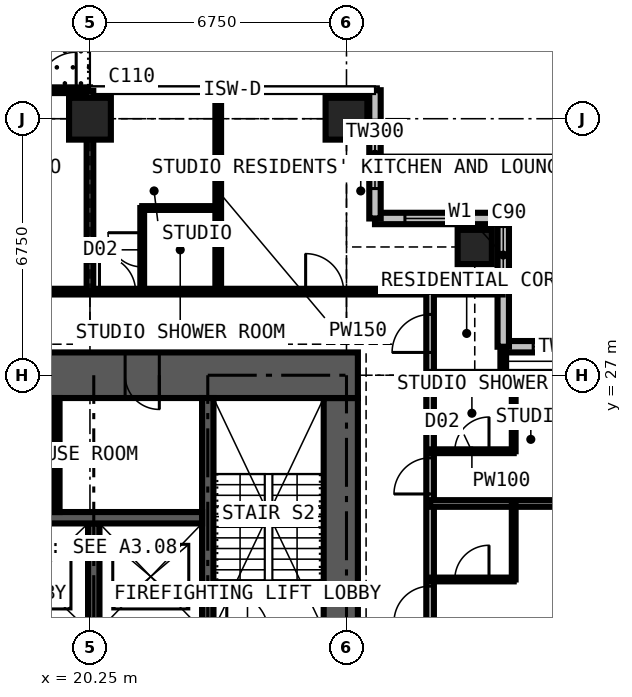
"""IFC4 building model, lengths in metres.
Left out: names, types, materials, properties, quantities, classifications, styles, units other than length and angle.
Written with IfcOpenShell. Run it as: python <this file> out.ifc"""

import sys

from ifc_helpers import new_model, si_unit, direction, frame, frame_2d, origin, origin_2d, place, context, subcontext, project, spatial, rectangle, extrude, element, fill, save


model = new_model("IFC4")
c1 = context("Model", 3, precision=1e-05, world=origin(), true_north=direction((0.0, 1.0)))
c2 = subcontext(c1, "Body", "Model", "MODEL_VIEW")
j1 = project(units=[si_unit("LENGTHUNIT", "METRE"), si_unit("PLANEANGLEUNIT", "RADIAN")], contexts=[c1])
p1 = place(None, origin())
s1 = spatial("IfcSite", under=j1, at=p1, CompositionType="ELEMENT")
p2 = place(p1, origin())
s2 = spatial("IfcBuilding", under=s1, at=p2, CompositionType="ELEMENT")
p3 = place(p2, frame((0.0, 0.0, 218.7)))
s3 = spatial("IfcBuildingStorey", under=s2, at=p3, CompositionType="ELEMENT", Elevation=218.7)
for number, where, z_axis, x_axis in (
    (1, (20.25, 33.75, 0.0), (0.0, 0.0, 1.0), (1.0, 0.0, 0.0)),
    (2, (27.0, 33.75, 0.0), (0.0, 0.0, 1.0), (1.0, 0.0, 0.0)),
):
    element("IfcColumn", number, at=place(p3, frame(where, z_axis=z_axis, x_axis=x_axis)), inside=s3, PredefinedType="COLUMN", context=c2, shape_type="SweptSolid", body=[
        extrude(rectangle(XDim=1.1, YDim=1.1, at=origin_2d()), origin(), (0.0, 0.0, 1.0), 3.6),
    ])
p4 = place(p3, frame((30.375, 30.375, 0.0), z_axis=(0.0, 0.0, 1.0), x_axis=(1.0, 0.0, 0.0)))
e3 = element("IfcColumn", 3, at=p4, inside=s3, PredefinedType="COLUMN", context=c2, shape_type="SweptSolid", body=[
    extrude(rectangle(XDim=0.9, YDim=0.9, at=origin_2d()), origin(), (0.0, 0.0, 1.0), 3.6),
])
p5 = place(p3, frame((26.85, 14.1, 0.0), z_axis=(0.0, 0.0, 1.0), x_axis=(0.0, 1.0, 0.0)))
e4 = element("IfcWall", 4, at=p5, inside=s3, PredefinedType="SHEAR", context=c2, shape_type="SweptSolid", body=[
    extrude(rectangle(XDim=12.3, YDim=0.9, at=frame_2d((6.15, 0.0))), origin(), (0.0, 0.0, 1.0), 3.6),
])
p6 = place(p5, frame((3.65, 0.0, 0.0)))
e5 = element("IfcOpeningElement", 5, at=p6, cuts=e4, PredefinedType="OPENING", context=c2, shape_type="SweptSolid", body=[
    extrude(rectangle(XDim=1.2, YDim=2.2, at=frame_2d((0.6, 1.1))), frame((0.0, 0.46, 0.0), z_axis=(0.0, -1.0, 0.0), x_axis=(1.0, 0.0, 0.0)), (0.0, 0.0, 1.0), 0.92),
])
p7 = place(p3, frame((27.3, 27.0, 0.0), z_axis=(0.0, 0.0, 1.0), x_axis=(-1.0, 0.0, 0.0)))
e6 = element("IfcWall", 6, at=p7, inside=s3, PredefinedType="SHEAR", context=c2, shape_type="SweptSolid", body=[
    extrude(rectangle(XDim=14.1, YDim=1.2, at=frame_2d((7.05, 0.0))), origin(), (0.0, 0.0, 1.0), 3.6),
])
p8 = place(p7, frame((5.225, 0.0, 0.0)))
e7 = element("IfcOpeningElement", 7, at=p8, cuts=e6, PredefinedType="OPENING", context=c2, shape_type="SweptSolid", body=[
    extrude(rectangle(XDim=0.9, YDim=2.2, at=frame_2d((0.45, 1.1))), frame((0.0, 0.61, 0.0), z_axis=(0.0, -1.0, 0.0), x_axis=(1.0, 0.0, 0.0)), (0.0, 0.0, 1.0), 1.22),
])
p9 = place(p7, frame((8.2, 0.0, 0.0)))
e8 = element("IfcOpeningElement", 8, at=p9, cuts=e6, PredefinedType="OPENING", context=c2, shape_type="SweptSolid", body=[
    extrude(rectangle(XDim=1.0, YDim=2.2, at=frame_2d((0.5, 1.1))), frame((0.0, 0.61, 0.0), z_axis=(0.0, -1.0, 0.0), x_axis=(1.0, 0.0, 0.0)), (0.0, 0.0, 1.0), 1.22),
])
p10 = place(p3, frame((34.5, 27.75, 0.0), z_axis=(0.0, 0.0, 1.0), x_axis=(-1.0, 0.0, 0.0)))
e9 = element("IfcWall", 9, at=p10, inside=s3, PredefinedType="SOLIDWALL", context=c2, shape_type="SweptSolid", body=[
    extrude(rectangle(XDim=3.375, YDim=0.3, at=frame_2d((1.688, 0.0))), origin(), (0.0, 0.0, 1.0), 3.375),
])
p11 = place(p10, frame((0.788, 0.0, 0.6)))
e10 = element("IfcOpeningElement", 10, at=p11, cuts=e9, PredefinedType="OPENING", context=c2, shape_type="SweptSolid", body=[
    extrude(rectangle(XDim=1.8, YDim=2.1, at=frame_2d((0.9, 1.05))), frame((0.0, 0.16, 0.0), z_axis=(0.0, -1.0, 0.0), x_axis=(1.0, 0.0, 0.0)), (0.0, 0.0, 1.0), 0.32),
])
p12 = place(p3, frame((31.125, 27.75, 0.0), z_axis=(0.0, 0.0, 1.0), x_axis=(0.0, 1.0, 0.0)))
e11 = element("IfcWall", 11, at=p12, inside=s3, PredefinedType="SOLIDWALL", context=c2, shape_type="SweptSolid", body=[
    extrude(rectangle(XDim=3.375, YDim=0.3, at=frame_2d((1.688, 0.0))), origin(), (0.0, 0.0, 1.0), 3.375),
])
p13 = place(p12, frame((1.663, 0.0, 0.9)))
e12 = element("IfcOpeningElement", 12, at=p13, cuts=e11, PredefinedType="OPENING", context=c2, shape_type="SweptSolid", body=[
    extrude(rectangle(XDim=1.5, YDim=1.8, at=frame_2d((0.75, 0.9))), frame((0.0, 0.16, 0.0), z_axis=(0.0, -1.0, 0.0), x_axis=(1.0, 0.0, 0.0)), (0.0, 0.0, 1.0), 0.32),
])
p14 = place(p3, frame((31.125, 31.125, 0.0), z_axis=(0.0, 0.0, 1.0), x_axis=(-1.0, 0.0, 0.0)))
e13 = element("IfcWall", 13, at=p14, inside=s3, PredefinedType="SOLIDWALL", context=c2, shape_type="SweptSolid", body=[
    extrude(rectangle(XDim=3.375, YDim=0.3, at=frame_2d((1.688, 0.0))), origin(), (0.0, 0.0, 1.0), 3.375),
])
p15 = place(p14, frame((0.788, 0.0, 0.6)))
e14 = element("IfcOpeningElement", 14, at=p15, cuts=e13, PredefinedType="OPENING", context=c2, shape_type="SweptSolid", body=[
    extrude(rectangle(XDim=1.8, YDim=2.1, at=frame_2d((0.9, 1.05))), frame((0.0, 0.16, 0.0), z_axis=(0.0, -1.0, 0.0), x_axis=(1.0, 0.0, 0.0)), (0.0, 0.0, 1.0), 0.32),
])
p16 = place(p3, frame((27.75, 31.125, 0.0), z_axis=(0.0, 0.0, 1.0), x_axis=(0.0, 1.0, 0.0)))
e15 = element("IfcWall", 15, at=p16, inside=s3, PredefinedType="SOLIDWALL", context=c2, shape_type="SweptSolid", body=[
    extrude(rectangle(XDim=3.375, YDim=0.3, at=frame_2d((1.688, 0.0))), origin(), (0.0, 0.0, 1.0), 3.375),
])
p17 = place(p16, frame((0.788, 0.0, 0.6)))
e16 = element("IfcOpeningElement", 16, at=p17, cuts=e15, PredefinedType="OPENING", context=c2, shape_type="SweptSolid", body=[
    extrude(rectangle(XDim=1.8, YDim=2.1, at=frame_2d((0.9, 1.05))), frame((0.0, 0.16, 0.0), z_axis=(0.0, -1.0, 0.0), x_axis=(1.0, 0.0, 0.0)), (0.0, 0.0, 1.0), 0.32),
])
p18 = place(p3, frame((13.5, 34.5, 0.0), z_axis=(0.0, 0.0, 1.0), x_axis=(1.0, 0.0, 0.0)))
e17 = element("IfcWall", 17, at=p18, inside=s3, PredefinedType="SOLIDWALL", context=c2, shape_type="SweptSolid", body=[
    extrude(rectangle(XDim=6.75, YDim=0.15, at=frame_2d((3.375, 0.0))), origin(), (0.0, 0.0, 1.0), 3.375),
])
p19 = place(p18, frame((0.363, 0.0, 0.0)))
e18 = element("IfcOpeningElement", 18, at=p19, cuts=e17, PredefinedType="OPENING", context=c2, shape_type="SweptSolid", body=[
    extrude(rectangle(XDim=1.0, YDim=2.2, at=frame_2d((0.5, 1.1))), frame((0.0, 0.085, 0.0), z_axis=(0.0, -1.0, 0.0), x_axis=(1.0, 0.0, 0.0)), (0.0, 0.0, 1.0), 0.17),
])
p20 = place(p18, frame((1.725, 0.0, 0.9)))
e19 = element("IfcOpeningElement", 19, at=p20, cuts=e17, PredefinedType="OPENING", context=c2, shape_type="SweptSolid", body=[
    extrude(rectangle(XDim=1.2, YDim=1.8, at=frame_2d((0.6, 0.9))), frame((0.0, 0.085, 0.0), z_axis=(0.0, -1.0, 0.0), x_axis=(1.0, 0.0, 0.0)), (0.0, 0.0, 1.0), 0.17),
])
p21 = place(p18, frame((5.387, 0.0, 0.0)))
e20 = element("IfcOpeningElement", 20, at=p21, cuts=e17, PredefinedType="OPENING", context=c2, shape_type="SweptSolid", body=[
    extrude(rectangle(XDim=1.0, YDim=2.2, at=frame_2d((0.5, 1.1))), frame((0.0, 0.085, 0.0), z_axis=(0.0, -1.0, 0.0), x_axis=(1.0, 0.0, 0.0)), (0.0, 0.0, 1.0), 0.17),
])
p22 = place(p18, frame((3.825, 0.0, 0.9)))
e21 = element("IfcOpeningElement", 21, at=p22, cuts=e17, PredefinedType="OPENING", context=c2, shape_type="SweptSolid", body=[
    extrude(rectangle(XDim=1.2, YDim=1.8, at=frame_2d((0.6, 0.9))), frame((0.0, 0.085, 0.0), z_axis=(0.0, -1.0, 0.0), x_axis=(1.0, 0.0, 0.0)), (0.0, 0.0, 1.0), 0.17),
])
p23 = place(p3, frame((23.35, 20.3, 0.0), z_axis=(0.0, 0.0, 1.0), x_axis=(0.0, 1.0, 0.0)))
e22 = element("IfcWall", 22, at=p23, inside=s3, PredefinedType="SHEAR", context=c2, shape_type="SweptSolid", body=[
    extrude(rectangle(XDim=6.1, YDim=0.3, at=frame_2d((3.05, 0.0))), origin(), (0.0, 0.0, 1.0), 3.6),
])
p24 = place(p3, frame((20.35, 20.3, 0.0), z_axis=(0.0, 0.0, 1.0), x_axis=(0.0, 1.0, 0.0)))
e23 = element("IfcWall", 23, at=p24, inside=s3, PredefinedType="SHEAR", context=c2, shape_type="SweptSolid", body=[
    extrude(rectangle(XDim=2.8, YDim=0.3, at=frame_2d((1.4, 0.0))), origin(), (0.0, 0.0, 1.0), 3.6),
])
p25 = place(p3, frame((17.3, 23.25, 0.0), z_axis=(0.0, 0.0, 1.0), x_axis=(1.0, 0.0, 0.0)))
e24 = element("IfcWall", 24, at=p25, inside=s3, PredefinedType="SHEAR", context=c2, shape_type="SweptSolid", body=[
    extrude(rectangle(XDim=5.9, YDim=0.3, at=frame_2d((2.95, 0.0))), origin(), (0.0, 0.0, 1.0), 3.6),
])
p26 = place(p3, frame((19.375, 23.4, 0.0), z_axis=(0.0, 0.0, 1.0), x_axis=(0.0, 1.0, 0.0)))
e25 = element("IfcWall", 25, at=p26, inside=s3, PredefinedType="PARTITIONING", context=c2, shape_type="SweptSolid", body=[
    extrude(rectangle(XDim=3.0, YDim=0.15, at=frame_2d((1.5, 0.0))), origin(), (0.0, 0.0, 1.0), 3.375),
])
p27 = place(p3, frame((11.3, 29.2, 0.0), z_axis=(0.0, 0.0, 1.0), x_axis=(1.0, 0.0, 0.0)))
e26 = element("IfcWall", 26, at=p27, inside=s3, PredefinedType="PARTITIONING", context=c2, shape_type="SweptSolid", body=[
    extrude(rectangle(XDim=19.809, YDim=0.15, at=frame_2d((9.904, 0.0))), origin(), (0.0, 0.0, 1.0), 3.375),
])
p28 = place(p27, frame((14.625, 0.0, 0.0)))
e27 = element("IfcOpeningElement", 27, at=p28, cuts=e26, PredefinedType="OPENING", context=c2, shape_type="SweptSolid", body=[
    extrude(rectangle(XDim=1.0, YDim=2.2, at=frame_2d((0.5, 1.1))), frame((0.0, 0.085, 0.0), z_axis=(0.0, -1.0, 0.0), x_axis=(1.0, 0.0, 0.0)), (0.0, 0.0, 1.0), 0.17),
])
p29 = place(p27, frame((6.4, 0.0, 0.0)))
e28 = element("IfcOpeningElement", 28, at=p29, cuts=e26, PredefinedType="OPENING", context=c2, shape_type="SweptSolid", body=[
    extrude(rectangle(XDim=0.95, YDim=2.2, at=frame_2d((0.475, 1.1))), frame((0.0, 0.085, 0.0), z_axis=(0.0, -1.0, 0.0), x_axis=(1.0, 0.0, 0.0)), (0.0, 0.0, 1.0), 0.17),
])
p30 = place(p27, frame((9.2, 0.0, 0.0)))
e29 = element("IfcOpeningElement", 29, at=p30, cuts=e26, PredefinedType="OPENING", context=c2, shape_type="SweptSolid", body=[
    extrude(rectangle(XDim=0.95, YDim=2.2, at=frame_2d((0.475, 1.1))), frame((0.0, 0.085, 0.0), z_axis=(0.0, -1.0, 0.0), x_axis=(1.0, 0.0, 0.0)), (0.0, 0.0, 1.0), 0.17),
])
p31 = place(p27, frame((0.6, 0.0, 0.0)))
e30 = element("IfcOpeningElement", 30, at=p31, cuts=e26, PredefinedType="OPENING", context=c2, shape_type="SweptSolid", body=[
    extrude(rectangle(XDim=1.0, YDim=2.2, at=frame_2d((0.5, 1.1))), frame((0.0, 0.085, 0.0), z_axis=(0.0, -1.0, 0.0), x_axis=(1.0, 0.0, 0.0)), (0.0, 0.0, 1.0), 0.17),
])
p32 = place(p3, frame((20.25, 29.2, 0.0), z_axis=(0.0, 0.0, 1.0), x_axis=(0.0, 1.0, 0.0)))
e31 = element("IfcWall", 31, at=p32, inside=s3, PredefinedType="PARTITIONING", context=c2, shape_type="SweptSolid", body=[
    extrude(rectangle(XDim=5.284, YDim=0.175, at=frame_2d((2.642, 0.0))), origin(), (0.0, 0.0, 1.0), 2.877),
])
p33 = place(p3, frame((21.625, 29.2, 0.0), z_axis=(0.0, 0.0, 1.0), x_axis=(0.0, 1.0, 0.0)))
e32 = element("IfcWall", 32, at=p33, inside=s3, PredefinedType="PARTITIONING", context=c2, shape_type="SweptSolid", body=[
    extrude(rectangle(XDim=2.2, YDim=0.1, at=frame_2d((1.1, 0.0))), origin(), (0.0, 0.0, 1.0), 3.375),
])
p34 = place(p33, frame((0.65, 0.0, 0.0)))
e33 = element("IfcOpeningElement", 33, at=p34, cuts=e32, PredefinedType="OPENING", context=c2, shape_type="SweptSolid", body=[
    extrude(rectangle(XDim=0.9, YDim=2.2, at=frame_2d((0.45, 1.1))), frame((0.0, 0.06, 0.0), z_axis=(0.0, -1.0, 0.0), x_axis=(1.0, 0.0, 0.0)), (0.0, 0.0, 1.0), 0.12),
])
p35 = place(p3, frame((21.625, 31.4, 0.0), z_axis=(0.0, 0.0, 1.0), x_axis=(1.0, 0.0, 0.0)))
e34 = element("IfcWall", 34, at=p35, inside=s3, PredefinedType="PARTITIONING", context=c2, shape_type="SweptSolid", body=[
    extrude(rectangle(XDim=2.0, YDim=0.1, at=frame_2d((1.0, 0.0))), origin(), (0.0, 0.0, 1.0), 3.375),
])
p36 = place(p3, frame((23.625, 29.2, 0.0), z_axis=(0.0, 0.0, 1.0), x_axis=(0.0, 1.0, 0.0)))
e35 = element("IfcWall", 35, at=p36, inside=s3, PredefinedType="PARTITIONING", context=c2, shape_type="SweptSolid", body=[
    extrude(rectangle(XDim=5.284, YDim=0.15, at=frame_2d((2.642, 0.0))), origin(), (0.0, 0.0, 1.0), 3.375),
])
p37 = place(p3, frame((29.2, 11.3, 0.0), z_axis=(0.0, 0.0, 1.0), x_axis=(0.0, 1.0, 0.0)))
e36 = element("IfcWall", 36, at=p37, inside=s3, PredefinedType="PARTITIONING", context=c2, shape_type="SweptSolid", body=[
    extrude(rectangle(XDim=17.9, YDim=0.2, at=frame_2d((8.95, 0.0))), origin(), (0.0, 0.0, 1.0), 3.375),
])
p38 = place(p37, frame((0.6, 0.0, 0.0)))
e37 = element("IfcOpeningElement", 37, at=p38, cuts=e36, PredefinedType="OPENING", context=c2, shape_type="SweptSolid", body=[
    extrude(rectangle(XDim=1.0, YDim=2.2, at=frame_2d((0.5, 1.1))), frame((0.0, 0.11, 0.0), z_axis=(0.0, -1.0, 0.0), x_axis=(1.0, 0.0, 0.0)), (0.0, 0.0, 1.0), 0.22),
])
p39 = place(p37, frame((2.4, 0.0, 0.0)))
e38 = element("IfcOpeningElement", 38, at=p39, cuts=e36, PredefinedType="OPENING", context=c2, shape_type="SweptSolid", body=[
    extrude(rectangle(XDim=0.95, YDim=2.2, at=frame_2d((0.475, 1.1))), frame((0.0, 0.11, 0.0), z_axis=(0.0, -1.0, 0.0), x_axis=(1.0, 0.0, 0.0)), (0.0, 0.0, 1.0), 0.22),
])
p40 = place(p37, frame((5.825, 0.0, 0.0)))
e39 = element("IfcOpeningElement", 39, at=p40, cuts=e36, PredefinedType="OPENING", context=c2, shape_type="SweptSolid", body=[
    extrude(rectangle(XDim=0.95, YDim=2.2, at=frame_2d((0.475, 1.1))), frame((0.0, 0.11, 0.0), z_axis=(0.0, -1.0, 0.0), x_axis=(1.0, 0.0, 0.0)), (0.0, 0.0, 1.0), 0.22),
])
p41 = place(p37, frame((9.2, 0.0, 0.0)))
e40 = element("IfcOpeningElement", 40, at=p41, cuts=e36, PredefinedType="OPENING", context=c2, shape_type="SweptSolid", body=[
    extrude(rectangle(XDim=0.95, YDim=2.2, at=frame_2d((0.475, 1.1))), frame((0.0, 0.11, 0.0), z_axis=(0.0, -1.0, 0.0), x_axis=(1.0, 0.0, 0.0)), (0.0, 0.0, 1.0), 0.22),
])
p42 = place(p37, frame((12.575, 0.0, 0.0)))
e41 = element("IfcOpeningElement", 41, at=p42, cuts=e36, PredefinedType="OPENING", context=c2, shape_type="SweptSolid", body=[
    extrude(rectangle(XDim=0.95, YDim=2.2, at=frame_2d((0.475, 1.1))), frame((0.0, 0.11, 0.0), z_axis=(0.0, -1.0, 0.0), x_axis=(1.0, 0.0, 0.0)), (0.0, 0.0, 1.0), 0.22),
])
p43 = place(p37, frame((16.3, 0.0, 0.0)))
e42 = element("IfcOpeningElement", 42, at=p43, cuts=e36, PredefinedType="OPENING", context=c2, shape_type="SweptSolid", body=[
    extrude(rectangle(XDim=1.0, YDim=2.2, at=frame_2d((0.5, 1.1))), frame((0.0, 0.11, 0.0), z_axis=(0.0, -1.0, 0.0), x_axis=(1.0, 0.0, 0.0)), (0.0, 0.0, 1.0), 0.22),
])
p44 = place(p3, frame((29.2, 21.625, 0.0), z_axis=(0.0, 0.0, 1.0), x_axis=(1.0, 0.0, 0.0)))
e43 = element("IfcWall", 43, at=p44, inside=s3, PredefinedType="PARTITIONING", context=c2, shape_type="SweptSolid", body=[
    extrude(rectangle(XDim=2.2, YDim=0.1, at=frame_2d((1.1, 0.0))), origin(), (0.0, 0.0, 1.0), 3.375),
])
p45 = place(p44, frame((0.65, 0.0, 0.0)))
e44 = element("IfcOpeningElement", 44, at=p45, cuts=e43, PredefinedType="OPENING", context=c2, shape_type="SweptSolid", body=[
    extrude(rectangle(XDim=0.9, YDim=2.2, at=frame_2d((0.45, 1.1))), frame((0.0, 0.06, 0.0), z_axis=(0.0, -1.0, 0.0), x_axis=(1.0, 0.0, 0.0)), (0.0, 0.0, 1.0), 0.12),
])
p46 = place(p3, frame((29.2, 23.625, 0.0), z_axis=(0.0, 0.0, 1.0), x_axis=(1.0, 0.0, 0.0)))
e45 = element("IfcWall", 45, at=p46, inside=s3, PredefinedType="PARTITIONING", context=c2, shape_type="SweptSolid", body=[
    extrude(rectangle(XDim=5.284, YDim=0.175, at=frame_2d((2.642, 0.0))), origin(), (0.0, 0.0, 1.0), 3.375),
])
p47 = place(p3, frame((29.2, 25.0, 0.0), z_axis=(0.0, 0.0, 1.0), x_axis=(1.0, 0.0, 0.0)))
e46 = element("IfcWall", 46, at=p47, inside=s3, PredefinedType="PARTITIONING", context=c2, shape_type="SweptSolid", body=[
    extrude(rectangle(XDim=2.2, YDim=0.1, at=frame_2d((1.1, 0.0))), origin(), (0.0, 0.0, 1.0), 3.375),
])
p48 = place(p47, frame((0.65, 0.0, 0.0)))
e47 = element("IfcOpeningElement", 47, at=p48, cuts=e46, PredefinedType="OPENING", context=c2, shape_type="SweptSolid", body=[
    extrude(rectangle(XDim=0.9, YDim=2.2, at=frame_2d((0.45, 1.1))), frame((0.0, 0.06, 0.0), z_axis=(0.0, -1.0, 0.0), x_axis=(1.0, 0.0, 0.0)), (0.0, 0.0, 1.0), 0.12),
])
p49 = place(p3, frame((29.2, 27.0, 0.0), z_axis=(0.0, 0.0, 1.0), x_axis=(1.0, 0.0, 0.0)))
e48 = element("IfcWall", 48, at=p49, inside=s3, PredefinedType="PARTITIONING", context=c2, shape_type="SweptSolid", body=[
    extrude(rectangle(XDim=5.284, YDim=0.175, at=frame_2d((2.642, 0.0))), origin(), (0.0, 0.0, 1.0), 2.877),
])
p50 = place(p3, frame((31.125, 27.0, 0.0), z_axis=(0.0, 0.0, 1.0), x_axis=(0.0, 1.0, 0.0)))
e49 = element("IfcWall", 49, at=p50, inside=s3, PredefinedType="PARTITIONING", context=c2, shape_type="SweptSolid", body=[
    extrude(rectangle(XDim=0.734, YDim=0.15, at=frame_2d((0.367, 0.0))), origin(), (0.0, 0.0, 1.0), 3.375),
])
for number, where, z_axis, x_axis in (
    (50, (31.4, 21.625, 0.0), (0.0, 0.0, 1.0), (0.0, 1.0, 0.0)),
    (51, (31.4, 25.0, 0.0), (0.0, 0.0, 1.0), (0.0, 1.0, 0.0)),
):
    element("IfcWall", number, at=place(p3, frame(where, z_axis=z_axis, x_axis=x_axis)), inside=s3, PredefinedType="PARTITIONING", context=c2, shape_type="SweptSolid", body=[
        extrude(rectangle(XDim=2.0, YDim=0.1, at=frame_2d((1.0, 0.0))), origin(), (0.0, 0.0, 1.0), 3.375),
    ])
p51 = place(p11, origin())
e52 = element("IfcWindow", 52, at=p51, inside=s3, PartitioningType="SINGLE_PANEL", PredefinedType="WINDOW", context=c2, shape_type="SweptSolid", body=[
    extrude(rectangle(XDim=1.8, YDim=2.1, at=frame_2d((0.9, 1.05))), frame((0.0, 0.03, 0.0), z_axis=(0.0, -1.0, 0.0), x_axis=(1.0, 0.0, 0.0)), (0.0, 0.0, 1.0), 0.06),
])
fill(e10, e52)
p52 = place(p13, origin())
e53 = element("IfcWindow", 53, at=p52, inside=s3, PartitioningType="SINGLE_PANEL", PredefinedType="WINDOW", context=c2, shape_type="SweptSolid", body=[
    extrude(rectangle(XDim=1.5, YDim=1.8, at=frame_2d((0.75, 0.9))), frame((0.0, 0.03, 0.0), z_axis=(0.0, -1.0, 0.0), x_axis=(1.0, 0.0, 0.0)), (0.0, 0.0, 1.0), 0.06),
])
fill(e12, e53)
p53 = place(p15, origin())
e54 = element("IfcWindow", 54, at=p53, inside=s3, PartitioningType="SINGLE_PANEL", PredefinedType="WINDOW", context=c2, shape_type="SweptSolid", body=[
    extrude(rectangle(XDim=1.8, YDim=2.1, at=frame_2d((0.9, 1.05))), frame((0.0, 0.03, 0.0), z_axis=(0.0, -1.0, 0.0), x_axis=(1.0, 0.0, 0.0)), (0.0, 0.0, 1.0), 0.06),
])
fill(e14, e54)
p54 = place(p17, origin())
e55 = element("IfcWindow", 55, at=p54, inside=s3, PartitioningType="SINGLE_PANEL", PredefinedType="WINDOW", context=c2, shape_type="SweptSolid", body=[
    extrude(rectangle(XDim=1.8, YDim=2.1, at=frame_2d((0.9, 1.05))), frame((0.0, 0.03, 0.0), z_axis=(0.0, -1.0, 0.0), x_axis=(1.0, 0.0, 0.0)), (0.0, 0.0, 1.0), 0.06),
])
fill(e16, e55)
p55 = place(p21, origin())
e56 = element("IfcDoor", 56, at=p55, inside=s3, OperationType="SINGLE_SWING_RIGHT", PredefinedType="DOOR", context=c2, shape_type="SweptSolid", body=[
    extrude(rectangle(XDim=1.0, YDim=2.2, at=frame_2d((0.5, 1.1))), frame((0.0, 0.025, 0.0), z_axis=(0.0, -1.0, 0.0), x_axis=(1.0, 0.0, 0.0)), (0.0, 0.0, 1.0), 0.05),
])
fill(e20, e56)
p56 = place(p8, origin())
e57 = element("IfcDoor", 57, at=p56, inside=s3, OperationType="SINGLE_SWING_LEFT", PredefinedType="DOOR", context=c2, shape_type="SweptSolid", body=[
    extrude(rectangle(XDim=0.9, YDim=2.2, at=frame_2d((0.45, 1.1))), frame((0.0, 0.4, 0.0), z_axis=(0.0, -1.0, 0.0), x_axis=(1.0, 0.0, 0.0)), (0.0, 0.0, 1.0), 0.8),
])
fill(e7, e57)
p57 = place(p41, origin())
e58 = element("IfcDoor", 58, at=p57, inside=s3, OperationType="SINGLE_SWING_LEFT", PredefinedType="DOOR", context=c2, shape_type="SweptSolid", body=[
    extrude(rectangle(XDim=0.95, YDim=2.2, at=frame_2d((0.475, 1.1))), frame((0.0, 0.025, 0.0), z_axis=(0.0, -1.0, 0.0), x_axis=(1.0, 0.0, 0.0)), (0.0, 0.0, 1.0), 0.05),
])
fill(e40, e58)
p58 = place(p45, origin())
e59 = element("IfcDoor", 59, at=p58, inside=s3, OperationType="SINGLE_SWING_RIGHT", PredefinedType="DOOR", context=c2, shape_type="SweptSolid", body=[
    extrude(rectangle(XDim=0.9, YDim=2.2, at=frame_2d((0.45, 1.1))), frame((0.0, 0.025, 0.0), z_axis=(0.0, -1.0, 0.0), x_axis=(1.0, 0.0, 0.0)), (0.0, 0.0, 1.0), 0.05),
])
fill(e44, e59)
p59 = place(p42, origin())
e60 = element("IfcDoor", 60, at=p59, inside=s3, OperationType="SINGLE_SWING_LEFT", PredefinedType="DOOR", context=c2, shape_type="SweptSolid", body=[
    extrude(rectangle(XDim=0.95, YDim=2.2, at=frame_2d((0.475, 1.1))), frame((0.0, 0.025, 0.0), z_axis=(0.0, -1.0, 0.0), x_axis=(1.0, 0.0, 0.0)), (0.0, 0.0, 1.0), 0.05),
])
fill(e41, e60)
p60 = place(p48, origin())
e61 = element("IfcDoor", 61, at=p60, inside=s3, OperationType="SINGLE_SWING_RIGHT", PredefinedType="DOOR", context=c2, shape_type="SweptSolid", body=[
    extrude(rectangle(XDim=0.9, YDim=2.2, at=frame_2d((0.45, 1.1))), frame((0.0, 0.025, 0.0), z_axis=(0.0, -1.0, 0.0), x_axis=(1.0, 0.0, 0.0)), (0.0, 0.0, 1.0), 0.05),
])
fill(e47, e61)
p61 = place(p43, origin())
e62 = element("IfcDoor", 62, at=p61, inside=s3, OperationType="SINGLE_SWING_LEFT", PredefinedType="DOOR", context=c2, shape_type="SweptSolid", body=[
    extrude(rectangle(XDim=1.0, YDim=2.2, at=frame_2d((0.5, 1.1))), frame((0.0, 0.025, 0.0), z_axis=(0.0, -1.0, 0.0), x_axis=(1.0, 0.0, 0.0)), (0.0, 0.0, 1.0), 0.05),
])
fill(e42, e62)
p62 = place(p28, origin())
e63 = element("IfcDoor", 63, at=p62, inside=s3, OperationType="SINGLE_SWING_LEFT", PredefinedType="DOOR", context=c2, shape_type="SweptSolid", body=[
    extrude(rectangle(XDim=1.0, YDim=2.2, at=frame_2d((0.5, 1.1))), frame((0.0, 0.025, 0.0), z_axis=(0.0, -1.0, 0.0), x_axis=(1.0, 0.0, 0.0)), (0.0, 0.0, 1.0), 0.05),
])
fill(e27, e63)
p63 = place(p30, origin())
e64 = element("IfcDoor", 64, at=p63, inside=s3, OperationType="SINGLE_SWING_LEFT", PredefinedType="DOOR", context=c2, shape_type="SweptSolid", body=[
    extrude(rectangle(XDim=0.95, YDim=2.2, at=frame_2d((0.475, 1.1))), frame((0.0, 0.025, 0.0), z_axis=(0.0, -1.0, 0.0), x_axis=(1.0, 0.0, 0.0)), (0.0, 0.0, 1.0), 0.05),
])
fill(e29, e64)
p64 = place(p34, origin())
e65 = element("IfcDoor", 65, at=p64, inside=s3, OperationType="SINGLE_SWING_RIGHT", PredefinedType="DOOR", context=c2, shape_type="SweptSolid", body=[
    extrude(rectangle(XDim=0.9, YDim=2.2, at=frame_2d((0.45, 1.1))), frame((0.0, 0.025, 0.0), z_axis=(0.0, -1.0, 0.0), x_axis=(1.0, 0.0, 0.0)), (0.0, 0.0, 1.0), 0.05),
])
fill(e33, e65)
save(model, sys.argv[1])
